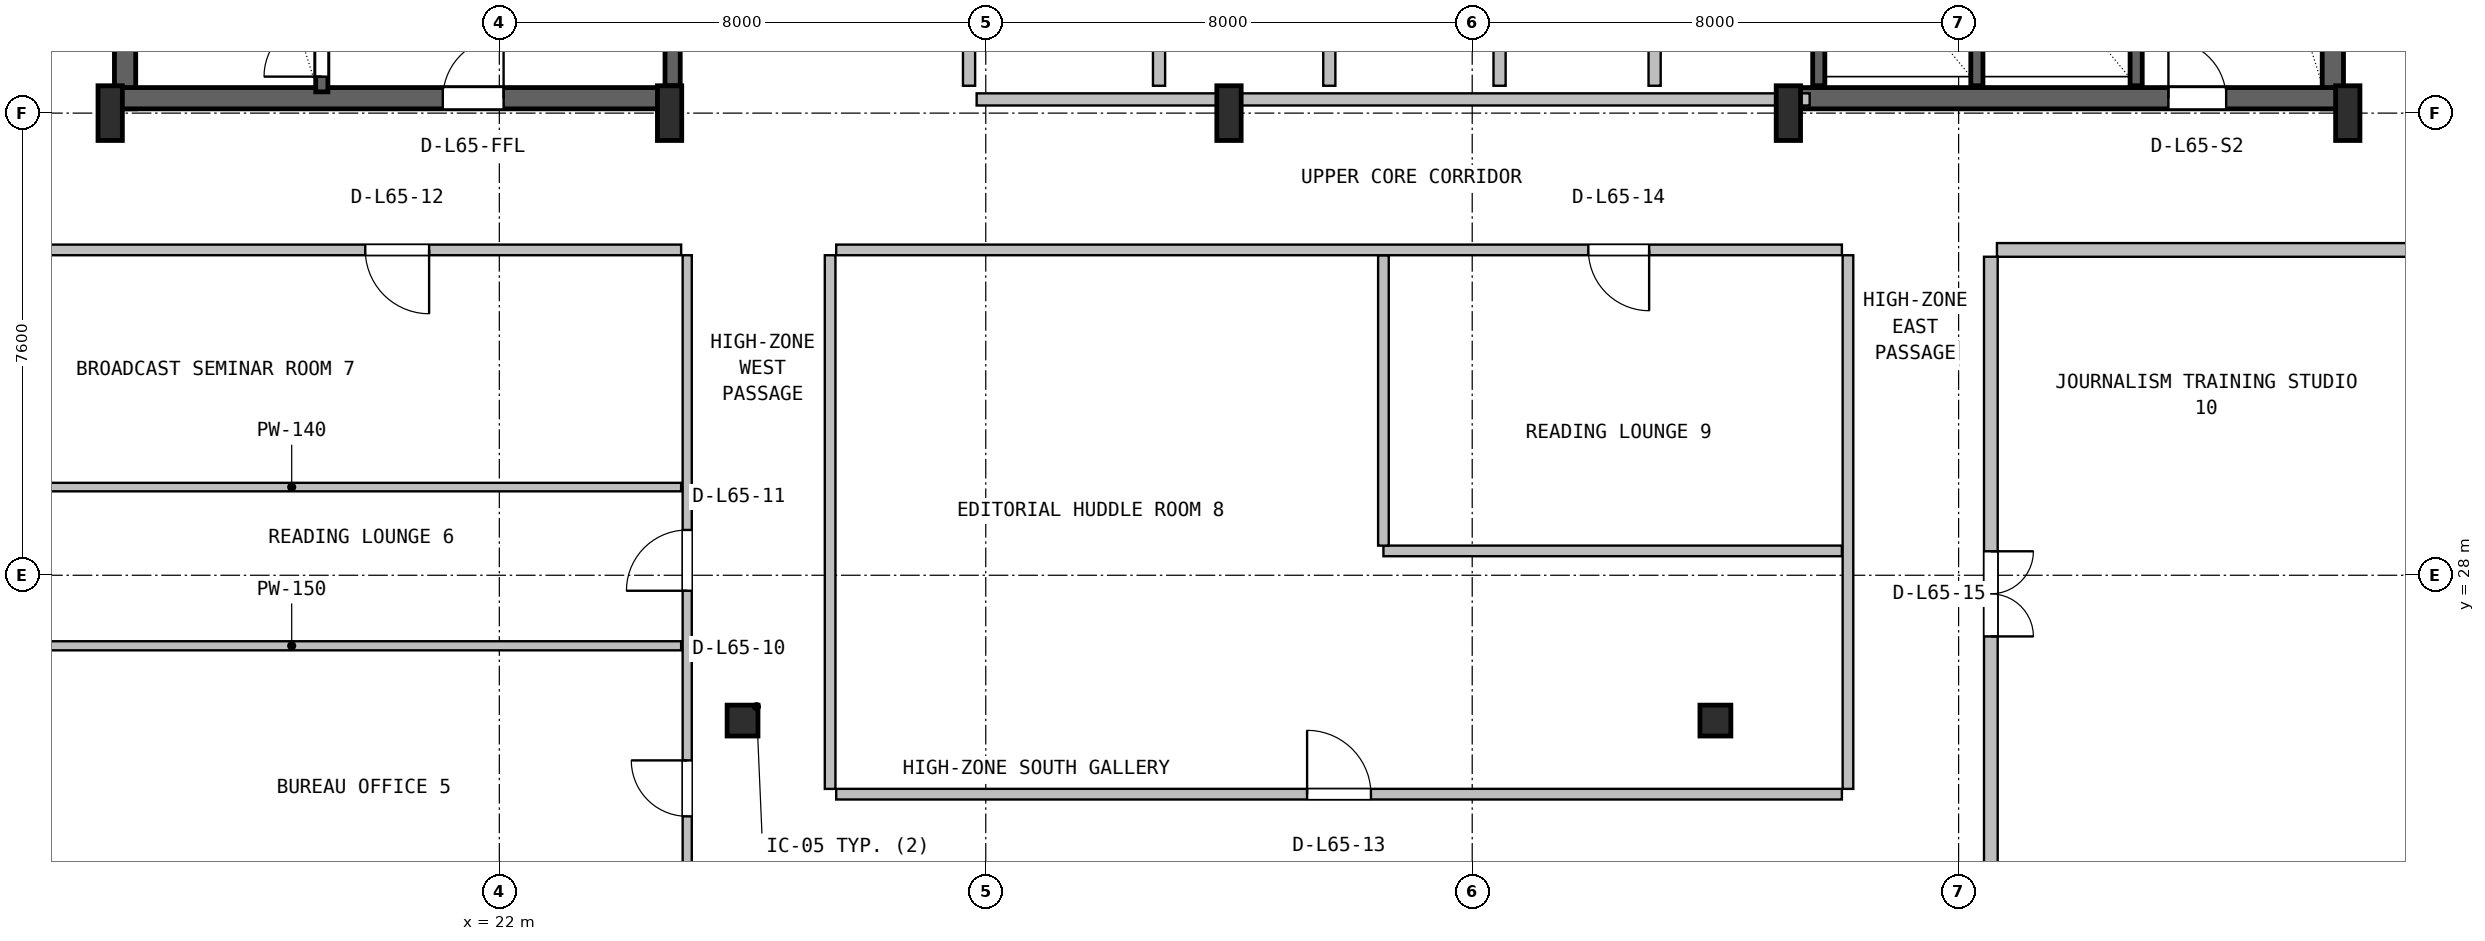
"""IFC4 building model, lengths in metres.
Left out: names, types, materials, properties, quantities, classifications, styles, units other than length and angle.
Written with IfcOpenShell. Run it as: python <this file> out.ifc"""

import sys

from ifc_helpers import new_model, si_unit, direction, frame, frame_2d, origin, origin_2d, place, context, subcontext, project, spatial, rectangle, hollow_circle, i_section, extrude, source, transform, mapped, element, fill, save


model = new_model("IFC4")
c1 = context("Model", 3, precision=1e-05, world=origin(), true_north=direction((0.0, 1.0)))
c2 = subcontext(c1, "Body", "Model", "MODEL_VIEW")
j1 = project(units=[si_unit("LENGTHUNIT", "METRE"), si_unit("PLANEANGLEUNIT", "RADIAN")], contexts=[c1])
p1 = place(None, origin())
s1 = spatial("IfcSite", under=j1, at=p1, CompositionType="ELEMENT")
p2 = place(p1, origin())
s2 = spatial("IfcBuilding", under=s1, at=p2, CompositionType="ELEMENT")
p3 = place(p2, frame((0.0, 0.0, 262.2)))
s3 = spatial("IfcBuildingStorey", under=s2, at=p3, CompositionType="ELEMENT", Elevation=262.2)
for number, where, z_axis, x_axis in (
    (1, (15.845, 35.67, 0.0), (0.0, 0.0, 1.0), (0.0, 1.0, 0.0)),
    (2, (52.155, 35.67, 0.0), (0.0, 0.0, 1.0), (0.0, 1.0, 0.0)),
):
    element("IfcWall", number, at=place(p3, frame(where, z_axis=z_axis, x_axis=x_axis)), inside=s3, PredefinedType="SHEAR", context=c2, shape_type="SweptSolid", body=[
        extrude(rectangle(XDim=11.13, YDim=0.35, at=frame_2d((5.565, 0.0))), origin(), (0.0, 0.0, 1.0), 3.55),
    ])
p4 = place(p3, frame((15.67, 35.845, 0.0), z_axis=(0.0, 0.0, 1.0), x_axis=(1.0, 0.0, 0.0)))
e3 = element("IfcWall", 3, at=p4, inside=s3, PredefinedType="SHEAR", context=c2, shape_type="SweptSolid", body=[
    extrude(rectangle(XDim=9.13, YDim=0.35, at=frame_2d((4.565, 0.0))), origin(), (0.0, 0.0, 1.0), 3.55),
])
p5 = place(p4, frame((5.4, 0.0, 0.0)))
e4 = element("IfcOpeningElement", 4, at=p5, cuts=e3, PredefinedType="OPENING", context=c2, shape_type="SweptSolid", body=[
    extrude(rectangle(XDim=1.0, YDim=2.1, at=frame_2d((0.5, 1.05))), frame((0.0, 0.185, 0.0), z_axis=(0.0, -1.0, 0.0), x_axis=(1.0, 0.0, 0.0)), (0.0, 0.0, 1.0), 0.37),
])
p6 = place(p3, frame((43.2, 35.845, 0.0), z_axis=(0.0, 0.0, 1.0), x_axis=(1.0, 0.0, 0.0)))
e5 = element("IfcWall", 5, at=p6, inside=s3, PredefinedType="SHEAR", context=c2, shape_type="SweptSolid", body=[
    extrude(rectangle(XDim=9.13, YDim=0.35, at=frame_2d((4.565, 0.0))), origin(), (0.0, 0.0, 1.0), 3.55),
])
p7 = place(p6, frame((6.25, 0.0, 0.0)))
e6 = element("IfcOpeningElement", 6, at=p7, cuts=e5, PredefinedType="OPENING", context=c2, shape_type="SweptSolid", body=[
    extrude(rectangle(XDim=0.95, YDim=2.1, at=frame_2d((0.475, 1.05))), frame((0.0, 0.185, 0.0), z_axis=(0.0, -1.0, 0.0), x_axis=(1.0, 0.0, 0.0)), (0.0, 0.0, 1.0), 0.37),
])
m1 = source(origin(), c2, "Body", "SweptSolid", [
    extrude(i_section(OverallWidth=0.4, OverallDepth=0.9, WebThickness=0.016, FlangeThickness=0.028, FilletRadius=0.016, at=origin_2d()), origin(), (0.0, 0.0, 1.0), 3.8),
])
for number, where, z_axis, x_axis in (
    (7, (15.6, 35.6, 0.0), (0.0, 0.0, 1.0), (1.0, 0.0, 0.0)),
    (8, (24.8, 35.6, 0.0), (0.0, 0.0, 1.0), (1.0, 0.0, 0.0)),
    (9, (34.0, 35.6, 0.0), (0.0, 0.0, 1.0), (1.0, 0.0, 0.0)),
    (10, (43.2, 35.6, 0.0), (0.0, 0.0, 1.0), (1.0, 0.0, 0.0)),
    (11, (52.4, 35.6, 0.0), (0.0, 0.0, 1.0), (1.0, 0.0, 0.0)),
):
    element("IfcColumn", number, at=place(p3, frame(where, z_axis=z_axis, x_axis=x_axis)), inside=s3, PredefinedType="COLUMN", context=c2, shape_type="MappedRepresentation", body=[
        mapped(m1, transform((0.0, 0.0, 0.0), x_axis=(1.0, 0.0, 0.0), y_axis=(0.0, 1.0, 0.0), z_axis=(0.0, 0.0, 1.0), scale=1.0)),
    ])
m2 = source(origin(), c2, "Body", "SweptSolid", [
    extrude(hollow_circle(Radius=0.254, WallThickness=0.02, at=origin_2d()), origin(), (0.0, 0.0, 1.0), 3.8),
])
for number, where, z_axis, x_axis in (
    (12, (26.0, 25.61, 0.0), (0.0, 0.0, 1.0), (1.0, 0.0, 0.0)),
    (13, (42.0, 25.61, 0.0), (0.0, 0.0, 1.0), (1.0, 0.0, 0.0)),
):
    element("IfcColumn", number, at=place(p3, frame(where, z_axis=z_axis, x_axis=x_axis)), inside=s3, PredefinedType="COLUMN", context=c2, shape_type="MappedRepresentation", body=[
        mapped(m2, transform((0.0, 0.0, 0.0), x_axis=(1.0, 0.0, 0.0), y_axis=(0.0, 1.0, 0.0), z_axis=(0.0, 0.0, 1.0), scale=1.0)),
    ])
p8 = place(p3, frame((19.08, 35.95, 0.0), z_axis=(0.0, 0.0, 1.0), x_axis=(0.0, 1.0, 0.0)))
e14 = element("IfcWall", 14, at=p8, inside=s3, PredefinedType="SHEAR", context=c2, shape_type="SweptSolid", body=[
    extrude(rectangle(XDim=9.65, YDim=0.2, at=frame_2d((4.825, 0.0))), origin(), (0.0, 0.0, 1.0), 3.55),
])
p9 = place(p8, frame((0.25, 0.0, 0.0)))
e15 = element("IfcOpeningElement", 15, at=p9, cuts=e14, PredefinedType="OPENING", context=c2, shape_type="SweptSolid", body=[
    extrude(rectangle(XDim=0.95, YDim=2.1, at=frame_2d((0.475, 1.05))), frame((0.0, 0.11, 0.0), z_axis=(0.0, -1.0, 0.0), x_axis=(1.0, 0.0, 0.0)), (0.0, 0.0, 1.0), 0.22),
])
p10 = place(p3, frame((24.85, 36.05, 0.0), z_axis=(0.0, 0.0, 1.0), x_axis=(0.0, 1.0, 0.0)))
e16 = element("IfcWall", 16, at=p10, inside=s3, PredefinedType="SHEAR", context=c2, shape_type="SweptSolid", body=[
    extrude(rectangle(XDim=10.45, YDim=0.25, at=frame_2d((5.225, 0.0))), origin(), (0.0, 0.0, 1.0), 3.55),
])
p11 = place(p3, frame((48.92, 36.05, 0.0), z_axis=(0.0, 0.0, 1.0), x_axis=(0.0, 1.0, 0.0)))
e17 = element("IfcWall", 17, at=p11, inside=s3, PredefinedType="SHEAR", context=c2, shape_type="SweptSolid", body=[
    extrude(rectangle(XDim=10.5, YDim=0.2, at=frame_2d((5.25, 0.0))), origin(), (0.0, 0.0, 1.0), 3.55),
])
for number, where, z_axis, x_axis in (
    (18, (43.7, 36.05, 0.0), (0.0, 0.0, 1.0), (0.0, 1.0, 0.0)),
    (19, (46.3, 36.05, 0.0), (0.0, 0.0, 1.0), (0.0, 1.0, 0.0)),
):
    element("IfcWall", number, at=place(p3, frame(where, z_axis=z_axis, x_axis=x_axis)), inside=s3, PredefinedType="SHEAR", context=c2, shape_type="SweptSolid", body=[
        extrude(rectangle(XDim=3.05, YDim=0.2, at=frame_2d((1.525, 0.0))), origin(), (0.0, 0.0, 1.0), 3.55),
    ])
p12 = place(p3, frame((29.85, 35.825, 0.0), z_axis=(0.0, 0.0, 1.0), x_axis=(1.0, 0.0, 0.0)))
e20 = element("IfcWall", 20, at=p12, inside=s3, PredefinedType="SOLIDWALL", context=c2, shape_type="SweptSolid", body=[
    extrude(rectangle(XDim=13.7, YDim=0.2, at=frame_2d((6.85, 0.0))), origin(), (0.0, 0.0, 1.0), 2.575),
])
for number, where, z_axis, x_axis in (
    (21, (32.85, 36.05, 0.0), (0.0, 0.0, 1.0), (0.0, 1.0, 0.0)),
    (22, (29.725, 36.05, 0.0), (0.0, 0.0, 1.0), (0.0, 1.0, 0.0)),
    (23, (35.65, 36.05, 0.0), (0.0, 0.0, 1.0), (0.0, 1.0, 0.0)),
    (24, (38.45, 36.05, 0.0), (0.0, 0.0, 1.0), (0.0, 1.0, 0.0)),
):
    element("IfcWall", number, at=place(p3, frame(where, z_axis=z_axis, x_axis=x_axis)), inside=s3, PredefinedType="PLUMBINGWALL", context=c2, shape_type="SweptSolid", body=[
        extrude(rectangle(XDim=3.1, YDim=0.2, at=frame_2d((1.55, 0.0))), origin(), (0.0, 0.0, 1.0), 3.53),
    ])
p13 = place(p3, frame((41.0, 36.05, 0.0), z_axis=(0.0, 0.0, 1.0), x_axis=(0.0, 1.0, 0.0)))
e25 = element("IfcWall", 25, at=p13, inside=s3, PredefinedType="SOLIDWALL", context=c2, shape_type="SweptSolid", body=[
    extrude(rectangle(XDim=3.1, YDim=0.2, at=frame_2d((1.55, 0.0))), origin(), (0.0, 0.0, 1.0), 3.53),
])
p14 = place(p3, frame((25.09, 22.137, 0.0), z_axis=(0.0, 0.0, 1.0), x_axis=(0.0, 1.0, 0.0)))
e26 = element("IfcWall", 26, at=p14, inside=s3, PredefinedType="PARTITIONING", context=c2, shape_type="SweptSolid", body=[
    extrude(rectangle(XDim=11.126, YDim=0.15, at=frame_2d((5.563, 0.0))), origin(), (0.0, 0.0, 1.0), 2.981),
])
p15 = place(p14, frame((1.898, 0.0, 0.0)))
e27 = element("IfcOpeningElement", 27, at=p15, cuts=e26, PredefinedType="OPENING", context=c2, shape_type="SweptSolid", body=[
    extrude(rectangle(XDim=0.92, YDim=2.08, at=frame_2d((0.46, 1.04))), frame((0.0, 0.085, 0.0), z_axis=(0.0, -1.0, 0.0), x_axis=(1.0, 0.0, 0.0)), (0.0, 0.0, 1.0), 0.17),
])
p16 = place(p14, frame((5.608, 0.0, 0.0)))
e28 = element("IfcOpeningElement", 28, at=p16, cuts=e26, PredefinedType="OPENING", context=c2, shape_type="SweptSolid", body=[
    extrude(rectangle(XDim=1.0, YDim=2.1, at=frame_2d((0.5, 1.05))), frame((0.0, 0.085, 0.0), z_axis=(0.0, -1.0, 0.0), x_axis=(1.0, 0.0, 0.0)), (0.0, 0.0, 1.0), 0.17),
])
p17 = place(p3, frame((12.18, 26.84, 0.0), z_axis=(0.0, 0.0, 1.0), x_axis=(1.0, 0.0, 0.0)))
e29 = element("IfcWall", 29, at=p17, inside=s3, PredefinedType="PARTITIONING", context=c2, shape_type="SweptSolid", body=[
    extrude(rectangle(XDim=12.81, YDim=0.15, at=frame_2d((6.405, 0.0))), origin(), (0.0, 0.0, 1.0), 3.171),
])
p18 = place(p3, frame((12.18, 29.45, 0.0), z_axis=(0.0, 0.0, 1.0), x_axis=(1.0, 0.0, 0.0)))
e30 = element("IfcWall", 30, at=p18, inside=s3, PredefinedType="PARTITIONING", context=c2, shape_type="SweptSolid", body=[
    extrude(rectangle(XDim=12.81, YDim=0.14, at=frame_2d((6.405, 0.0))), origin(), (0.0, 0.0, 1.0), 3.171),
])
p19 = place(p3, frame((12.18, 33.35, 0.0), z_axis=(0.0, 0.0, 1.0), x_axis=(1.0, 0.0, 0.0)))
e31 = element("IfcWall", 31, at=p19, inside=s3, PredefinedType="PARTITIONING", context=c2, shape_type="SweptSolid", body=[
    extrude(rectangle(XDim=12.81, YDim=0.175, at=frame_2d((6.405, 0.0))), origin(), (0.0, 0.0, 1.0), 2.981),
])
p20 = place(p19, frame((7.615, 0.0, 0.0)))
e32 = element("IfcOpeningElement", 32, at=p20, cuts=e31, PredefinedType="OPENING", context=c2, shape_type="SweptSolid", body=[
    extrude(rectangle(XDim=1.05, YDim=2.1, at=frame_2d((0.525, 1.05))), frame((0.0, 0.098, 0.0), z_axis=(0.0, -1.0, 0.0), x_axis=(1.0, 0.0, 0.0)), (0.0, 0.0, 1.0), 0.195),
])
p21 = place(p3, frame((27.54, 24.4, 0.0), z_axis=(0.0, 0.0, 1.0), x_axis=(1.0, 0.0, 0.0)))
e33 = element("IfcWall", 33, at=p21, inside=s3, PredefinedType="PARTITIONING", context=c2, shape_type="SweptSolid", body=[
    extrude(rectangle(XDim=16.54, YDim=0.175, at=frame_2d((8.27, 0.0))), origin(), (0.0, 0.0, 1.0), 2.981),
])
p22 = place(p21, frame((7.745, 0.0, 0.0)))
e34 = element("IfcOpeningElement", 34, at=p22, cuts=e33, PredefinedType="OPENING", context=c2, shape_type="SweptSolid", body=[
    extrude(rectangle(XDim=1.05, YDim=2.1, at=frame_2d((0.525, 1.05))), frame((0.0, 0.098, 0.0), z_axis=(0.0, -1.0, 0.0), x_axis=(1.0, 0.0, 0.0)), (0.0, 0.0, 1.0), 0.195),
])
p23 = place(p3, frame((44.18, 24.487, 0.0), z_axis=(0.0, 0.0, 1.0), x_axis=(0.0, 1.0, 0.0)))
e35 = element("IfcWall", 35, at=p23, inside=s3, PredefinedType="PARTITIONING", context=c2, shape_type="SweptSolid", body=[
    extrude(rectangle(XDim=8.776, YDim=0.175, at=frame_2d((4.388, 0.0))), origin(), (0.0, 0.0, 1.0), 3.278),
])
p24 = place(p3, frame((36.54, 28.4, 0.0), z_axis=(0.0, 0.0, 1.0), x_axis=(1.0, 0.0, 0.0)))
e36 = element("IfcWall", 36, at=p24, inside=s3, PredefinedType="PARTITIONING", context=c2, shape_type="SweptSolid", body=[
    extrude(rectangle(XDim=7.54, YDim=0.175, at=frame_2d((3.77, 0.0))), origin(), (0.0, 0.0, 1.0), 2.981),
])
p25 = place(p3, frame((36.54, 28.487, 0.0), z_axis=(0.0, 0.0, 1.0), x_axis=(0.0, 1.0, 0.0)))
e37 = element("IfcWall", 37, at=p25, inside=s3, PredefinedType="PARTITIONING", context=c2, shape_type="SweptSolid", body=[
    extrude(rectangle(XDim=4.776, YDim=0.175, at=frame_2d((2.388, 0.0))), origin(), (0.0, 0.0, 1.0), 3.53),
])
p26 = place(p3, frame((27.54, 33.35, 0.0), z_axis=(0.0, 0.0, 1.0), x_axis=(1.0, 0.0, 0.0)))
e38 = element("IfcWall", 38, at=p26, inside=s3, PredefinedType="PARTITIONING", context=c2, shape_type="SweptSolid", body=[
    extrude(rectangle(XDim=16.54, YDim=0.175, at=frame_2d((8.27, 0.0))), origin(), (0.0, 0.0, 1.0), 2.981),
])
p27 = place(p26, frame((12.37, 0.0, 0.0)))
e39 = element("IfcOpeningElement", 39, at=p27, cuts=e38, PredefinedType="OPENING", context=c2, shape_type="SweptSolid", body=[
    extrude(rectangle(XDim=1.0, YDim=2.1, at=frame_2d((0.5, 1.05))), frame((0.0, 0.098, 0.0), z_axis=(0.0, -1.0, 0.0), x_axis=(1.0, 0.0, 0.0)), (0.0, 0.0, 1.0), 0.195),
])
p28 = place(p3, frame((27.44, 24.487, 0.0), z_axis=(0.0, 0.0, 1.0), x_axis=(0.0, 1.0, 0.0)))
e40 = element("IfcWall", 40, at=p28, inside=s3, PredefinedType="PARTITIONING", context=c2, shape_type="SweptSolid", body=[
    extrude(rectangle(XDim=8.776, YDim=0.175, at=frame_2d((4.388, 0.0))), origin(), (0.0, 0.0, 1.0), 2.981),
])
p29 = place(p3, frame((46.63, 33.35, 0.0), z_axis=(0.0, 0.0, 1.0), x_axis=(1.0, 0.0, 0.0)))
e41 = element("IfcWall", 41, at=p29, inside=s3, PredefinedType="PARTITIONING", context=c2, shape_type="SweptSolid", body=[
    extrude(rectangle(XDim=9.19, YDim=0.225, at=frame_2d((4.595, 0.0))), origin(), (0.0, 0.0, 1.0), 3.171),
])
p30 = place(p3, frame((46.53, 22.137, 0.0), z_axis=(0.0, 0.0, 1.0), x_axis=(0.0, 1.0, 0.0)))
e42 = element("IfcWall", 42, at=p30, inside=s3, PredefinedType="PARTITIONING", context=c2, shape_type="SweptSolid", body=[
    extrude(rectangle(XDim=11.101, YDim=0.225, at=frame_2d((5.551, 0.0))), origin(), (0.0, 0.0, 1.0), 3.222),
])
p31 = place(p30, frame((4.857, 0.0, 0.0)))
e43 = element("IfcOpeningElement", 43, at=p31, cuts=e42, PredefinedType="OPENING", context=c2, shape_type="SweptSolid", body=[
    extrude(rectangle(XDim=1.4, YDim=2.12, at=frame_2d((0.7, 1.06))), frame((0.0, 0.123, 0.0), z_axis=(0.0, -1.0, 0.0), x_axis=(1.0, 0.0, 0.0)), (0.0, 0.0, 1.0), 0.245),
])
m3 = source(origin(), c2, "Body", "SweptSolid", [
    extrude(rectangle(XDim=0.95, YDim=2.1, at=frame_2d((0.475, 1.05))), frame((0.0, 0.025, 0.0), z_axis=(0.0, -1.0, 0.0), x_axis=(1.0, 0.0, 0.0)), (0.0, 0.0, 1.0), 0.05),
])
p32 = place(p9, origin())
e44 = element("IfcDoor", 44, at=p32, inside=s3, OperationType="SINGLE_SWING_LEFT", PredefinedType="DOOR", context=c2, shape_type="MappedRepresentation", body=[
    mapped(m3, transform((0.0, 0.0, 0.0), x_axis=(1.0, 0.0, 0.0), y_axis=(0.0, 1.0, 0.0), z_axis=(0.0, 0.0, 1.0), scale=1.0)),
])
fill(e15, e44)
m4 = source(origin(), c2, "Body", "SweptSolid", [
    extrude(rectangle(XDim=1.0, YDim=2.1, at=frame_2d((0.5, 1.05))), frame((0.0, 0.025, 0.0), z_axis=(0.0, -1.0, 0.0), x_axis=(1.0, 0.0, 0.0)), (0.0, 0.0, 1.0), 0.05),
])
p33 = place(p5, origin())
e45 = element("IfcDoor", 45, at=p33, inside=s3, OperationType="SINGLE_SWING_RIGHT", PredefinedType="DOOR", context=c2, shape_type="MappedRepresentation", body=[
    mapped(m4, transform((0.0, 0.0, 0.0), x_axis=(1.0, 0.0, 0.0), y_axis=(0.0, 1.0, 0.0), z_axis=(0.0, 0.0, 1.0), scale=1.0)),
])
fill(e4, e45)
p34 = place(p7, origin())
e46 = element("IfcDoor", 46, at=p34, inside=s3, OperationType="SINGLE_SWING_LEFT", PredefinedType="DOOR", context=c2, shape_type="MappedRepresentation", body=[
    mapped(m3, transform((0.0, 0.0, 0.0), x_axis=(1.0, 0.0, 0.0), y_axis=(0.0, 1.0, 0.0), z_axis=(0.0, 0.0, 1.0), scale=1.0)),
])
fill(e6, e46)
m5 = source(origin(), c2, "Body", "SweptSolid", [
    extrude(rectangle(XDim=0.92, YDim=2.08, at=frame_2d((0.46, 1.04))), frame((0.0, 0.025, 0.0), z_axis=(0.0, -1.0, 0.0), x_axis=(1.0, 0.0, 0.0)), (0.0, 0.0, 1.0), 0.05),
])
p35 = place(p15, origin())
e47 = element("IfcDoor", 47, at=p35, inside=s3, OperationType="SINGLE_SWING_RIGHT", PredefinedType="DOOR", context=c2, shape_type="MappedRepresentation", body=[
    mapped(m5, transform((0.0, 0.0, 0.0), x_axis=(1.0, 0.0, 0.0), y_axis=(0.0, 1.0, 0.0), z_axis=(0.0, 0.0, 1.0), scale=1.0)),
])
fill(e27, e47)
m6 = source(origin(), c2, "Body", "SweptSolid", [
    extrude(rectangle(XDim=1.0, YDim=2.1, at=frame_2d((0.5, 1.05))), frame((0.0, 0.025, 0.0), z_axis=(0.0, -1.0, 0.0), x_axis=(1.0, 0.0, 0.0)), (0.0, 0.0, 1.0), 0.05),
])
p36 = place(p16, origin())
e48 = element("IfcDoor", 48, at=p36, inside=s3, OperationType="SINGLE_SWING_LEFT", PredefinedType="DOOR", context=c2, shape_type="MappedRepresentation", body=[
    mapped(m6, transform((0.0, 0.0, 0.0), x_axis=(1.0, 0.0, 0.0), y_axis=(0.0, 1.0, 0.0), z_axis=(0.0, 0.0, 1.0), scale=1.0)),
])
fill(e28, e48)
m7 = source(origin(), c2, "Body", "SweptSolid", [
    extrude(rectangle(XDim=1.05, YDim=2.1, at=frame_2d((0.525, 1.05))), frame((0.0, 0.025, 0.0), z_axis=(0.0, -1.0, 0.0), x_axis=(1.0, 0.0, 0.0)), (0.0, 0.0, 1.0), 0.05),
])
p37 = place(p20, frame((1.05, 0.0, 0.0), z_axis=(0.0, 0.0, 1.0), x_axis=(-1.0, 0.0, 0.0)))
e49 = element("IfcDoor", 49, at=p37, inside=s3, OperationType="SINGLE_SWING_RIGHT", PredefinedType="DOOR", context=c2, shape_type="MappedRepresentation", body=[
    mapped(m7, transform((0.0, 0.0, 0.0), x_axis=(1.0, 0.0, 0.0), y_axis=(0.0, 1.0, 0.0), z_axis=(0.0, 0.0, 1.0), scale=1.0)),
])
fill(e32, e49)
p38 = place(p22, origin())
e50 = element("IfcDoor", 50, at=p38, inside=s3, OperationType="SINGLE_SWING_LEFT", PredefinedType="DOOR", context=c2, shape_type="MappedRepresentation", body=[
    mapped(m7, transform((0.0, 0.0, 0.0), x_axis=(1.0, 0.0, 0.0), y_axis=(0.0, 1.0, 0.0), z_axis=(0.0, 0.0, 1.0), scale=1.0)),
])
fill(e34, e50)
p39 = place(p27, frame((1.0, 0.0, 0.0), z_axis=(0.0, 0.0, 1.0), x_axis=(-1.0, 0.0, 0.0)))
e51 = element("IfcDoor", 51, at=p39, inside=s3, OperationType="SINGLE_SWING_RIGHT", PredefinedType="DOOR", context=c2, shape_type="MappedRepresentation", body=[
    mapped(m6, transform((0.0, 0.0, 0.0), x_axis=(1.0, 0.0, 0.0), y_axis=(0.0, 1.0, 0.0), z_axis=(0.0, 0.0, 1.0), scale=1.0)),
])
fill(e39, e51)
m8 = source(origin(), c2, "Body", "SweptSolid", [
    extrude(rectangle(XDim=1.4, YDim=2.12, at=frame_2d((0.7, 1.06))), frame((0.0, 0.025, 0.0), z_axis=(0.0, -1.0, 0.0), x_axis=(1.0, 0.0, 0.0)), (0.0, 0.0, 1.0), 0.05),
])
p40 = place(p31, frame((1.4, 0.0, 0.0), z_axis=(0.0, 0.0, 1.0), x_axis=(-1.0, 0.0, 0.0)))
e52 = element("IfcDoor", 52, at=p40, inside=s3, OperationType="DOUBLE_DOOR_SINGLE_SWING", PredefinedType="DOOR", context=c2, shape_type="MappedRepresentation", body=[
    mapped(m8, transform((0.0, 0.0, 0.0), x_axis=(1.0, 0.0, 0.0), y_axis=(0.0, 1.0, 0.0), z_axis=(0.0, 0.0, 1.0), scale=1.0)),
])
fill(e43, e52)
save(model, sys.argv[1])
